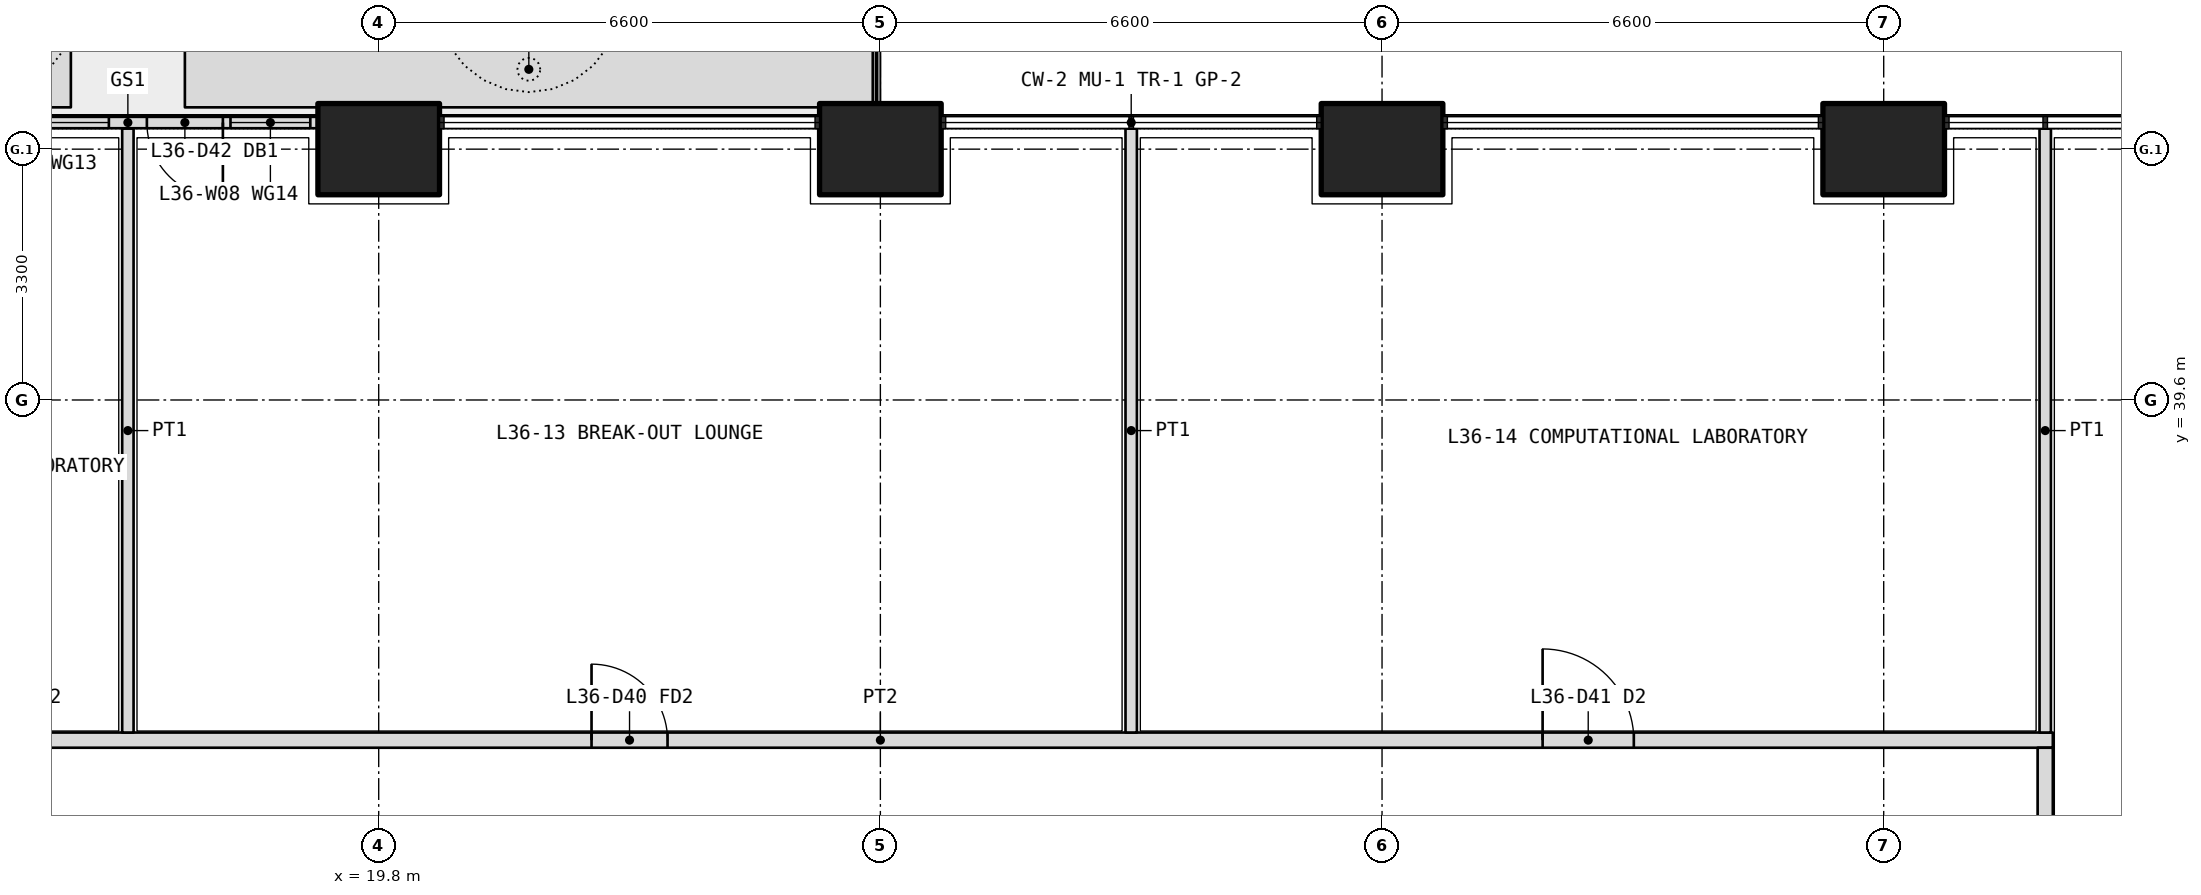
"""IFC4 building model, lengths in metres.
Left out: names, types, materials, properties, quantities, classifications, styles, units other than length and angle.
Written with IfcOpenShell. Run it as: python <this file> out.ifc"""

import sys

from ifc_helpers import new_model, si_unit, direction, frame, frame_2d, origin, origin_2d, place, context, subcontext, project, spatial, polyline, rectangle, outline, extrude, element, fill, save


model = new_model("IFC4")
c1 = context("Model", 3, precision=1e-05, world=origin(), true_north=direction((0.0, 1.0)))
c2 = subcontext(c1, "Body", "Model", "MODEL_VIEW")
j1 = project(units=[si_unit("LENGTHUNIT", "METRE"), si_unit("PLANEANGLEUNIT", "RADIAN")], contexts=[c1])
p1 = place(None, origin())
s1 = spatial("IfcSite", under=j1, at=p1, CompositionType="ELEMENT")
p2 = place(p1, origin())
s2 = spatial("IfcBuilding", under=s1, at=p2, CompositionType="ELEMENT")
p3 = place(p2, frame((0.0, 0.0, 159.9)))
s3 = spatial("IfcBuildingStorey", under=s2, at=p3, CompositionType="ELEMENT", Elevation=159.9)
for number, where, z_axis, x_axis in (
    (1, (19.8, 42.9, 0.0), (0.0, 0.0, 1.0), (1.0, 0.0, 0.0)),
    (2, (26.4, 42.9, 0.0), (0.0, 0.0, 1.0), (1.0, 0.0, 0.0)),
    (3, (33.0, 42.9, 0.0), (0.0, 0.0, 1.0), (1.0, 0.0, 0.0)),
    (4, (39.6, 42.9, 0.0), (0.0, 0.0, 1.0), (1.0, 0.0, 0.0)),
):
    element("IfcColumn", number, at=place(p3, frame(where, z_axis=z_axis, x_axis=x_axis)), inside=s3, PredefinedType="COLUMN", context=c2, shape_type="SweptSolid", body=[
        extrude(rectangle(XDim=1.6, YDim=1.2, at=origin_2d()), origin(), (0.0, 0.0, 1.0), 4.2),
    ])
p4 = place(p3, origin())
e5 = element("IfcWall", 5, at=p4, inside=s3, PredefinedType="USERDEFINED", context=c2, shape_type="SweptSolid", body=[
    extrude(outline(polyline([(13.3, 43.45), (15.75, 43.45), (15.75, 44.45), (13.3, 44.45), (13.3, 43.45)]), holes=[polyline([(13.45, 43.6), (15.6, 43.6), (15.6, 44.3), (13.45, 44.3), (13.45, 43.6)])]), origin(), (0.0, 0.0, 1.0), 1.05),
])
p5 = place(p3, origin())
e6 = element("IfcWall", 6, at=p5, inside=s3, PredefinedType="USERDEFINED", context=c2, shape_type="SweptSolid", body=[
    extrude(outline(polyline([(17.25, 43.45), (26.3, 43.45), (26.3, 44.45), (17.25, 44.45), (17.25, 43.45)]), holes=[polyline([(17.4, 43.6), (26.15, 43.6), (26.15, 44.3), (17.4, 44.3), (17.4, 43.6)])]), origin(), (0.0, 0.0, 1.0), 1.05),
])
p6 = place(p3, frame((19.0, 43.25, 0.0), z_axis=(0.0, 0.0, 1.0), x_axis=(-1.0, 0.0, 0.0)))
e7 = element("IfcWall", 7, at=p6, inside=s3, PredefinedType="SOLIDWALL", context=c2, shape_type="SweptSolid", body=[
    extrude(rectangle(XDim=5.0, YDim=0.15, at=frame_2d((2.5, 0.0))), origin(), (0.0, 0.0, 1.0), 2.7),
])
p7 = place(p6, frame((1.25, 0.0, 0.0)))
e8 = element("IfcOpeningElement", 8, at=p7, cuts=e7, PredefinedType="OPENING", context=c2, shape_type="SweptSolid", body=[
    extrude(rectangle(XDim=1.0, YDim=2.4, at=frame_2d((0.5, 1.2))), frame((0.0, 0.085, 0.0), z_axis=(0.0, -1.0, 0.0), x_axis=(1.0, 0.0, 0.0)), (0.0, 0.0, 1.0), 0.17),
])
p8 = place(p6, frame((0.1, 0.0, 0.1)))
e9 = element("IfcOpeningElement", 9, at=p8, cuts=e7, PredefinedType="OPENING", context=c2, shape_type="SweptSolid", body=[
    extrude(rectangle(XDim=1.05, YDim=2.3, at=frame_2d((0.525, 1.15))), frame((0.0, 0.085, 0.0), z_axis=(0.0, -1.0, 0.0), x_axis=(1.0, 0.0, 0.0)), (0.0, 0.0, 1.0), 0.17),
])
p9 = place(p6, frame((2.75, 0.0, 0.1)))
e10 = element("IfcOpeningElement", 10, at=p9, cuts=e7, PredefinedType="OPENING", context=c2, shape_type="SweptSolid", body=[
    extrude(rectangle(XDim=2.15, YDim=2.3, at=frame_2d((1.075, 1.15))), frame((0.0, 0.085, 0.0), z_axis=(0.0, -1.0, 0.0), x_axis=(1.0, 0.0, 0.0)), (0.0, 0.0, 1.0), 0.17),
])
p10 = place(p3, frame((10.975, 35.125, 0.0), z_axis=(0.0, 0.0, 1.0), x_axis=(1.0, 0.0, 0.0)))
e11 = element("IfcWall", 11, at=p10, inside=s3, PredefinedType="PARTITIONING", context=c2, shape_type="SweptSolid", body=[
    extrude(rectangle(XDim=30.85, YDim=0.2, at=frame_2d((15.425, 0.0))), origin(), (0.0, 0.0, 1.0), 2.85),
])
p11 = place(p10, frame((0.663, 0.0, 0.0)))
e12 = element("IfcOpeningElement", 12, at=p11, cuts=e11, PredefinedType="OPENING", context=c2, shape_type="SweptSolid", body=[
    extrude(rectangle(XDim=1.0, YDim=2.1, at=frame_2d((0.5, 1.05))), frame((0.0, 0.11, 0.0), z_axis=(0.0, -1.0, 0.0), x_axis=(1.0, 0.0, 0.0)), (0.0, 0.0, 1.0), 0.22),
])
p12 = place(p10, frame((3.275, 0.0, 0.0)))
e13 = element("IfcOpeningElement", 13, at=p12, cuts=e11, PredefinedType="OPENING", context=c2, shape_type="SweptSolid", body=[
    extrude(rectangle(XDim=1.2, YDim=2.1, at=frame_2d((0.6, 1.05))), frame((0.0, 0.11, 0.0), z_axis=(0.0, -1.0, 0.0), x_axis=(1.0, 0.0, 0.0)), (0.0, 0.0, 1.0), 0.22),
])
p13 = place(p10, frame((11.625, 0.0, 0.0)))
e14 = element("IfcOpeningElement", 14, at=p13, cuts=e11, PredefinedType="OPENING", context=c2, shape_type="SweptSolid", body=[
    extrude(rectangle(XDim=1.0, YDim=2.1, at=frame_2d((0.5, 1.05))), frame((0.0, 0.11, 0.0), z_axis=(0.0, -1.0, 0.0), x_axis=(1.0, 0.0, 0.0)), (0.0, 0.0, 1.0), 0.22),
])
p14 = place(p10, frame((24.137, 0.0, 0.0)))
e15 = element("IfcOpeningElement", 15, at=p14, cuts=e11, PredefinedType="OPENING", context=c2, shape_type="SweptSolid", body=[
    extrude(rectangle(XDim=1.2, YDim=2.1, at=frame_2d((0.6, 1.05))), frame((0.0, 0.11, 0.0), z_axis=(0.0, -1.0, 0.0), x_axis=(1.0, 0.0, 0.0)), (0.0, 0.0, 1.0), 0.22),
])
p15 = place(p3, frame((41.725, 11.175, 0.0), z_axis=(0.0, 0.0, 1.0), x_axis=(0.0, 1.0, 0.0)))
e16 = element("IfcWall", 16, at=p15, inside=s3, PredefinedType="PARTITIONING", context=c2, shape_type="SweptSolid", body=[
    extrude(rectangle(XDim=23.85, YDim=0.2, at=frame_2d((11.925, 0.0))), origin(), (0.0, 0.0, 1.0), 2.85),
])
p16 = place(p15, frame((3.762, 0.0, 0.0)))
e17 = element("IfcOpeningElement", 17, at=p16, cuts=e16, PredefinedType="OPENING", context=c2, shape_type="SweptSolid", body=[
    extrude(rectangle(XDim=1.0, YDim=2.1, at=frame_2d((0.5, 1.05))), frame((0.0, 0.11, 0.0), z_axis=(0.0, -1.0, 0.0), x_axis=(1.0, 0.0, 0.0)), (0.0, 0.0, 1.0), 0.22),
])
p17 = place(p15, frame((9.625, 0.0, 0.0)))
e18 = element("IfcOpeningElement", 18, at=p17, cuts=e16, PredefinedType="OPENING", context=c2, shape_type="SweptSolid", body=[
    extrude(rectangle(XDim=1.0, YDim=2.1, at=frame_2d((0.5, 1.05))), frame((0.0, 0.11, 0.0), z_axis=(0.0, -1.0, 0.0), x_axis=(1.0, 0.0, 0.0)), (0.0, 0.0, 1.0), 0.22),
])
p18 = place(p15, frame((12.975, 0.0, 0.0)))
e19 = element("IfcOpeningElement", 19, at=p18, cuts=e16, PredefinedType="OPENING", context=c2, shape_type="SweptSolid", body=[
    extrude(rectangle(XDim=0.9, YDim=2.1, at=frame_2d((0.45, 1.05))), frame((0.0, 0.11, 0.0), z_axis=(0.0, -1.0, 0.0), x_axis=(1.0, 0.0, 0.0)), (0.0, 0.0, 1.0), 0.22),
])
p19 = place(p15, frame((19.087, 0.0, 0.0)))
e20 = element("IfcOpeningElement", 20, at=p19, cuts=e16, PredefinedType="OPENING", context=c2, shape_type="SweptSolid", body=[
    extrude(rectangle(XDim=1.0, YDim=2.1, at=frame_2d((0.5, 1.05))), frame((0.0, 0.11, 0.0), z_axis=(0.0, -1.0, 0.0), x_axis=(1.0, 0.0, 0.0)), (0.0, 0.0, 1.0), 0.22),
])
for number, where, z_axis, x_axis in (
    (21, (41.725, 43.17, 0.0), (0.0, 0.0, 1.0), (0.0, -1.0, 0.0)),
    (22, (16.5, 43.17, 0.0), (0.0, 0.0, 1.0), (0.0, -1.0, 0.0)),
    (23, (29.7, 43.17, 0.0), (0.0, 0.0, 1.0), (0.0, -1.0, 0.0)),
):
    element("IfcWall", number, at=place(p3, frame(where, z_axis=z_axis, x_axis=x_axis)), inside=s3, PredefinedType="PARTITIONING", context=c2, shape_type="SweptSolid", body=[
        extrude(rectangle(XDim=7.945, YDim=0.15, at=frame_2d((3.972, 0.0))), origin(), (0.0, 0.0, 1.0), 2.7),
    ])
p20 = place(p7, origin())
e24 = element("IfcDoor", 24, at=p20, inside=s3, OperationType="SINGLE_SWING_LEFT", PredefinedType="DOOR", context=c2, shape_type="SweptSolid", body=[
    extrude(rectangle(XDim=1.0, YDim=2.4, at=frame_2d((0.5, 1.2))), frame((0.0, 0.025, 0.0), z_axis=(0.0, -1.0, 0.0), x_axis=(1.0, 0.0, 0.0)), (0.0, 0.0, 1.0), 0.05),
])
fill(e8, e24)
p21 = place(p8, origin())
e25 = element("IfcWindow", 25, at=p21, inside=s3, PartitioningType="SINGLE_PANEL", PredefinedType="WINDOW", context=c2, shape_type="SweptSolid", body=[
    extrude(rectangle(XDim=1.05, YDim=2.3, at=frame_2d((0.525, 1.15))), frame((0.0, 0.03, 0.0), z_axis=(0.0, -1.0, 0.0), x_axis=(1.0, 0.0, 0.0)), (0.0, 0.0, 1.0), 0.06),
])
fill(e9, e25)
p22 = place(p9, origin())
e26 = element("IfcWindow", 26, at=p22, inside=s3, PartitioningType="SINGLE_PANEL", PredefinedType="WINDOW", context=c2, shape_type="SweptSolid", body=[
    extrude(rectangle(XDim=2.15, YDim=2.3, at=frame_2d((1.075, 1.15))), frame((0.0, 0.03, 0.0), z_axis=(0.0, -1.0, 0.0), x_axis=(1.0, 0.0, 0.0)), (0.0, 0.0, 1.0), 0.06),
])
fill(e10, e26)
p23 = place(p13, origin())
e27 = element("IfcDoor", 27, at=p23, inside=s3, OperationType="SINGLE_SWING_LEFT", PredefinedType="DOOR", context=c2, shape_type="SweptSolid", body=[
    extrude(rectangle(XDim=1.0, YDim=2.1, at=frame_2d((0.5, 1.05))), frame((0.0, 0.025, 0.0), z_axis=(0.0, -1.0, 0.0), x_axis=(1.0, 0.0, 0.0)), (0.0, 0.0, 1.0), 0.05),
])
fill(e14, e27)
p24 = place(p14, origin())
e28 = element("IfcDoor", 28, at=p24, inside=s3, OperationType="DOUBLE_DOOR_SINGLE_SWING", PredefinedType="DOOR", context=c2, shape_type="SweptSolid", body=[
    extrude(rectangle(XDim=1.2, YDim=2.1, at=frame_2d((0.6, 1.05))), frame((0.0, 0.025, 0.0), z_axis=(0.0, -1.0, 0.0), x_axis=(1.0, 0.0, 0.0)), (0.0, 0.0, 1.0), 0.05),
])
fill(e15, e28)
save(model, sys.argv[1])
